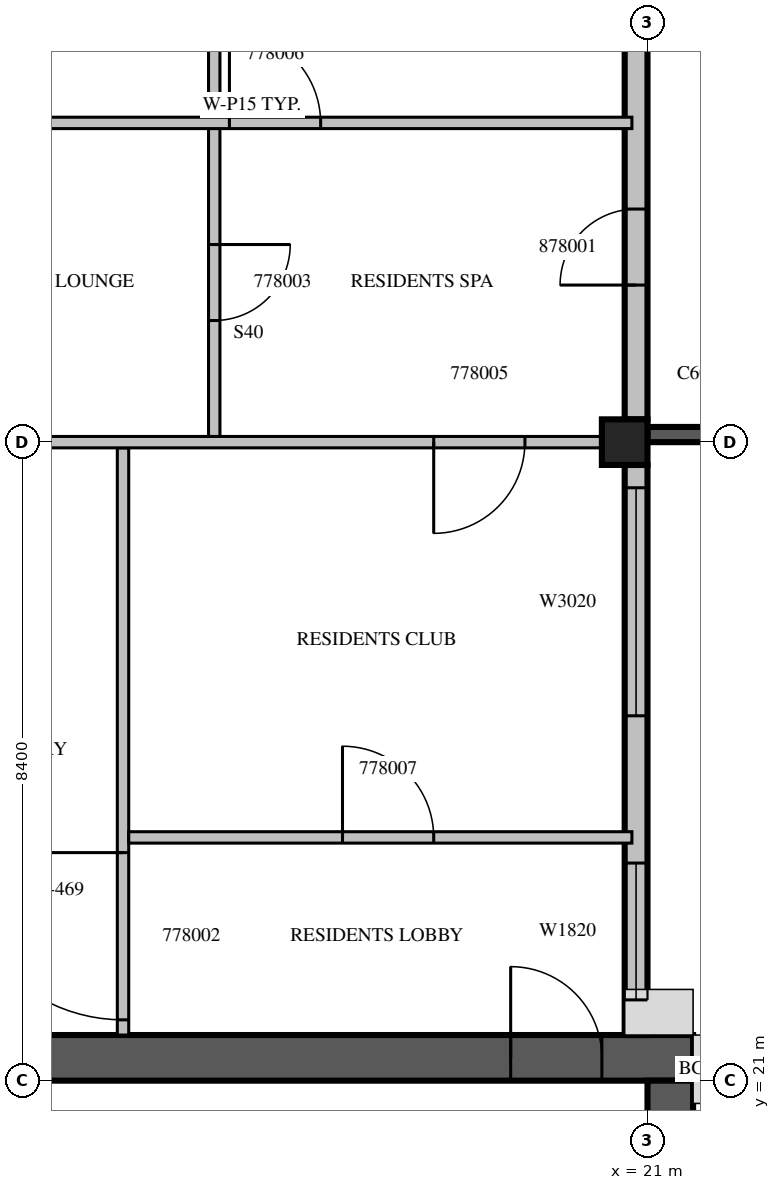
"""IFC4 building model, lengths in metres.
Left out: names, types, materials, properties, quantities, classifications, styles, units other than length and angle.
Written with IfcOpenShell. Run it as: python <this file> out.ifc"""

import sys

from ifc_helpers import new_model, si_unit, direction, frame, frame_2d, origin, origin_2d, place, context, subcontext, project, spatial, rectangle, extrude, source, transform, mapped, element, fill, save


model = new_model("IFC4")
c1 = context("Model", 3, precision=1e-05, world=origin(), true_north=direction((0.0, 1.0)))
c2 = subcontext(c1, "Body", "Model", "MODEL_VIEW")
j1 = project(units=[si_unit("LENGTHUNIT", "METRE"), si_unit("PLANEANGLEUNIT", "RADIAN")], contexts=[c1])
p1 = place(None, origin())
s1 = spatial("IfcSite", under=j1, at=p1, CompositionType="ELEMENT")
p2 = place(p1, origin())
s2 = spatial("IfcBuilding", under=s1, at=p2, CompositionType="ELEMENT")
p3 = place(p2, frame((0.0, 0.0, 333.5)))
s3 = spatial("IfcBuildingStorey", under=s2, at=p3, CompositionType="ELEMENT", Elevation=333.5)
m1 = source(origin(), c2, "Body", "SweptSolid", [
    extrude(rectangle(XDim=0.6, YDim=0.6, at=origin_2d()), origin(), (0.0, 0.0, 1.0), 3.5),
])
p4 = place(p3, frame((20.7, 29.4, 0.0), z_axis=(0.0, 0.0, 1.0), x_axis=(1.0, 0.0, 0.0)))
e1 = element("IfcColumn", 1, at=p4, inside=s3, PredefinedType="COLUMN", context=c2, shape_type="MappedRepresentation", body=[
    mapped(m1, transform((0.0, 0.0, 0.0), scale=1.0)),
])
m2 = source(origin(), c2, "Body", "SweptSolid", [
    extrude(rectangle(XDim=11.1, YDim=0.6, at=frame_2d((5.55, 0.0))), origin(), (0.0, 0.0, 1.0), 3.5),
])
p5 = place(p3, frame((10.5, 21.3, 0.0), z_axis=(0.0, 0.0, 1.0), x_axis=(1.0, 0.0, 0.0)))
e2 = element("IfcWall", 2, at=p5, inside=s3, PredefinedType="SHEAR", context=c2, shape_type="MappedRepresentation", body=[
    mapped(m2, transform((0.0, 0.0, 0.0), scale=1.0)),
])
m3 = source(origin(), c2, "Body", "SweptSolid", [
    extrude(rectangle(XDim=1.2, YDim=2.1, at=frame_2d((0.6, 1.05))), frame((0.0, 0.31, 0.0), z_axis=(0.0, -1.0, 0.0), x_axis=(1.0, 0.0, 0.0)), (0.0, 0.0, 1.0), 0.62),
])
p6 = place(p5, frame((8.7, 0.0, 0.0)))
e3 = element("IfcOpeningElement", 3, at=p6, cuts=e2, PredefinedType="OPENING", context=c2, shape_type="MappedRepresentation", body=[
    mapped(m3, transform((0.0, 0.0, 0.0), scale=1.0)),
])
p7 = place(p3, frame((21.3, 4.2, 0.0), z_axis=(0.0, 0.0, 1.0), x_axis=(0.0, 1.0, 0.0)))
e4 = element("IfcWall", 4, at=p7, inside=s3, PredefinedType="SHEAR", context=c2, shape_type="SweptSolid", body=[
    extrude(rectangle(XDim=16.8, YDim=0.6, at=frame_2d((8.4, 0.0))), origin(), (0.0, 0.0, 1.0), 3.5),
])
p8 = place(p7, frame((4.2, 0.0, 0.0)))
e5 = element("IfcOpeningElement", 5, at=p8, cuts=e4, PredefinedType="OPENING", context=c2, shape_type="MappedRepresentation", body=[
    mapped(m3, transform((0.0, 0.0, 0.0), scale=1.0)),
])
m4 = source(origin(), c2, "Body", "SweptSolid", [
    extrude(rectangle(XDim=1.2, YDim=2.4, at=frame_2d((0.6, 1.2))), frame((0.0, 0.31, 0.0), z_axis=(0.0, -1.0, 0.0), x_axis=(1.0, 0.0, 0.0)), (0.0, 0.0, 1.0), 0.62),
])
p9 = place(p7, frame((12.0, 0.0, 0.6)))
e6 = element("IfcOpeningElement", 6, at=p9, cuts=e4, PredefinedType="OPENING", context=c2, shape_type="MappedRepresentation", body=[
    mapped(m4, transform((0.0, 0.0, 0.0), scale=1.0)),
])
m5 = source(origin(), c2, "Body", "SweptSolid", [
    extrude(rectangle(XDim=3.9, YDim=0.2, at=frame_2d((1.95, 0.0))), origin(), (0.0, 0.0, 1.0), 3.1),
])
p10 = place(p3, frame((21.0, 29.5, 0.0), z_axis=(0.0, 0.0, 1.0), x_axis=(1.0, 0.0, 0.0)))
e7 = element("IfcWall", 7, at=p10, inside=s3, PredefinedType="SOLIDWALL", context=c2, shape_type="MappedRepresentation", body=[
    mapped(m5, transform((0.0, 0.0, 0.0), scale=1.0)),
])
m6 = source(origin(), c2, "Body", "SweptSolid", [
    extrude(rectangle(XDim=2.4, YDim=2.0, at=frame_2d((1.2, 1.0))), frame((0.0, 0.11, 0.0), z_axis=(0.0, -1.0, 0.0), x_axis=(1.0, 0.0, 0.0)), (0.0, 0.0, 1.0), 0.22),
])
p11 = place(p10, frame((0.75, 0.0, 0.6)))
e8 = element("IfcOpeningElement", 8, at=p11, cuts=e7, PredefinedType="OPENING", context=c2, shape_type="MappedRepresentation", body=[
    mapped(m6, transform((0.0, 0.0, 0.0), scale=1.0)),
])
m7 = source(origin(), c2, "Body", "SweptSolid", [
    extrude(rectangle(XDim=7.5, YDim=0.3, at=frame_2d((3.75, 0.0))), origin(), (0.0, 0.0, 1.0), 3.1),
])
p12 = place(p3, frame((20.85, 21.6, 0.0), z_axis=(0.0, 0.0, 1.0), x_axis=(0.0, 1.0, 0.0)))
e9 = element("IfcWall", 9, at=p12, inside=s3, PredefinedType="STANDARD", context=c2, shape_type="MappedRepresentation", body=[
    mapped(m7, transform((0.0, 0.0, 0.0), scale=1.0)),
])
m8 = source(origin(), c2, "Body", "SweptSolid", [
    extrude(rectangle(XDim=1.8, YDim=2.0, at=frame_2d((0.9, 1.0))), frame((0.0, 0.16, 0.0), z_axis=(0.0, -1.0, 0.0), x_axis=(1.0, 0.0, 0.0)), (0.0, 0.0, 1.0), 0.32),
])
p13 = place(p12, frame((0.463, 0.0, 0.6)))
e10 = element("IfcOpeningElement", 10, at=p13, cuts=e9, PredefinedType="OPENING", context=c2, shape_type="MappedRepresentation", body=[
    mapped(m8, transform((0.0, 0.0, 0.0), scale=1.0)),
])
m9 = source(origin(), c2, "Body", "SweptSolid", [
    extrude(rectangle(XDim=3.0, YDim=2.0, at=frame_2d((1.5, 1.0))), frame((0.0, 0.16, 0.0), z_axis=(0.0, -1.0, 0.0), x_axis=(1.0, 0.0, 0.0)), (0.0, 0.0, 1.0), 0.32),
])
p14 = place(p12, frame((4.2, 0.0, 0.6)))
e11 = element("IfcOpeningElement", 11, at=p14, cuts=e9, PredefinedType="OPENING", context=c2, shape_type="MappedRepresentation", body=[
    mapped(m9, transform((0.0, 0.0, 0.0), scale=1.0)),
])
m10 = source(origin(), c2, "Body", "SweptSolid", [
    extrude(rectangle(XDim=7.8, YDim=0.3, at=frame_2d((3.9, 0.0))), origin(), (0.0, 0.0, 1.0), 3.1),
])
p15 = place(p3, frame((20.85, 29.7, 0.0), z_axis=(0.0, 0.0, 1.0), x_axis=(0.0, 1.0, 0.0)))
e12 = element("IfcWall", 12, at=p15, inside=s3, PredefinedType="STANDARD", context=c2, shape_type="MappedRepresentation", body=[
    mapped(m10, transform((0.0, 0.0, 0.0), scale=1.0)),
])
m11 = source(origin(), c2, "Body", "SweptSolid", [
    extrude(rectangle(XDim=1.0, YDim=2.1, at=frame_2d((0.5, 1.05))), frame((0.0, 0.16, 0.0), z_axis=(0.0, -1.0, 0.0), x_axis=(1.0, 0.0, 0.0)), (0.0, 0.0, 1.0), 0.32),
])
p16 = place(p15, frame((1.767, 0.0, 0.0)))
e13 = element("IfcOpeningElement", 13, at=p16, cuts=e12, PredefinedType="OPENING", context=c2, shape_type="MappedRepresentation", body=[
    mapped(m11, transform((0.0, 0.0, 0.0), scale=1.0)),
])
m12 = source(origin(), c2, "Body", "SweptSolid", [
    extrude(rectangle(XDim=7.725, YDim=0.15, at=frame_2d((3.862, 0.0))), origin(), (0.0, 0.0, 1.0), 3.1),
])
p17 = place(p3, frame((14.1, 29.325, 0.0), z_axis=(0.0, 0.0, 1.0), x_axis=(0.0, -1.0, 0.0)))
e14 = element("IfcWall", 14, at=p17, inside=s3, PredefinedType="PARTITIONING", context=c2, shape_type="MappedRepresentation", body=[
    mapped(m12, transform((0.0, 0.0, 0.0), scale=1.0)),
])
m13 = source(origin(), c2, "Body", "SweptSolid", [
    extrude(rectangle(XDim=2.2, YDim=2.1, at=frame_2d((1.1, 1.05))), frame((0.0, 0.085, 0.0), z_axis=(0.0, -1.0, 0.0), x_axis=(1.0, 0.0, 0.0)), (0.0, 0.0, 1.0), 0.17),
])
p18 = place(p17, frame((5.325, 0.0, 0.0)))
e15 = element("IfcOpeningElement", 15, at=p18, cuts=e14, PredefinedType="OPENING", context=c2, shape_type="MappedRepresentation", body=[
    mapped(m13, transform((0.0, 0.0, 0.0), scale=1.0)),
])
m14 = source(origin(), c2, "Body", "SweptSolid", [
    extrude(rectangle(XDim=6.62, YDim=0.15, at=frame_2d((3.31, 0.0))), origin(), (0.0, 0.0, 1.0), 3.1),
])
p19 = place(p3, frame((14.175, 24.2, 0.0), z_axis=(0.0, 0.0, 1.0), x_axis=(1.0, 0.0, 0.0)))
e16 = element("IfcWall", 16, at=p19, inside=s3, PredefinedType="PARTITIONING", context=c2, shape_type="MappedRepresentation", body=[
    mapped(m14, transform((0.0, 0.0, 0.0), scale=1.0)),
])
m15 = source(origin(), c2, "Body", "SweptSolid", [
    extrude(rectangle(XDim=1.2, YDim=2.1, at=frame_2d((0.6, 1.05))), frame((0.0, 0.085, 0.0), z_axis=(0.0, -1.0, 0.0), x_axis=(1.0, 0.0, 0.0)), (0.0, 0.0, 1.0), 0.17),
])
p20 = place(p19, frame((2.812, 0.0, 0.0)))
e17 = element("IfcOpeningElement", 17, at=p20, cuts=e16, PredefinedType="OPENING", context=c2, shape_type="MappedRepresentation", body=[
    mapped(m15, transform((0.0, 0.0, 0.0), scale=1.0)),
])
p21 = place(p3, frame((15.3, 33.6, 0.0), z_axis=(0.0, 0.0, 1.0), x_axis=(0.0, -1.0, 0.0)))
e18 = element("IfcWall", 18, at=p21, inside=s3, PredefinedType="PARTITIONING", context=c2, shape_type="SweptSolid", body=[
    extrude(rectangle(XDim=4.2, YDim=0.15, at=frame_2d((2.1, 0.0))), origin(), (0.0, 0.0, 1.0), 3.1),
])
m16 = source(origin(), c2, "Body", "SweptSolid", [
    extrude(rectangle(XDim=1.0, YDim=2.1, at=frame_2d((0.5, 1.05))), frame((0.0, 0.085, 0.0), z_axis=(0.0, -1.0, 0.0), x_axis=(1.0, 0.0, 0.0)), (0.0, 0.0, 1.0), 0.17),
])
p22 = place(p21, frame((1.6, 0.0, 0.0)))
e19 = element("IfcOpeningElement", 19, at=p22, cuts=e18, PredefinedType="OPENING", context=c2, shape_type="MappedRepresentation", body=[
    mapped(m16, transform((0.0, 0.0, 0.0), scale=1.0)),
])
p23 = place(p3, frame((15.3, 37.725, 0.0), z_axis=(0.0, 0.0, 1.0), x_axis=(0.0, -1.0, 0.0)))
e20 = element("IfcWall", 20, at=p23, inside=s3, PredefinedType="PARTITIONING", context=c2, shape_type="SweptSolid", body=[
    extrude(rectangle(XDim=4.105, YDim=0.15, at=frame_2d((2.053, 0.0))), origin(), (0.0, 0.0, 1.0), 3.1),
])
p24 = place(p23, frame((1.525, 0.0, 0.0)))
e21 = element("IfcOpeningElement", 21, at=p24, cuts=e20, PredefinedType="OPENING", context=c2, shape_type="MappedRepresentation", body=[
    mapped(m16, transform((0.0, 0.0, 0.0), scale=1.0)),
])
m17 = source(origin(), c2, "Body", "SweptSolid", [
    extrude(rectangle(XDim=9.302, YDim=0.15, at=frame_2d((4.651, 0.0))), origin(), (0.0, 0.0, 1.0), 3.1),
])
p25 = place(p3, frame((11.099, 29.4, 0.0), z_axis=(0.0, 0.0, 1.0), x_axis=(1.0, 0.0, 0.0)))
e22 = element("IfcWall", 22, at=p25, inside=s3, PredefinedType="PARTITIONING", context=c2, shape_type="MappedRepresentation", body=[
    mapped(m17, transform((0.0, 0.0, 0.0), scale=1.0)),
])
p26 = place(p25, frame((7.088, 0.0, 0.0)))
e23 = element("IfcOpeningElement", 23, at=p26, cuts=e22, PredefinedType="OPENING", context=c2, shape_type="MappedRepresentation", body=[
    mapped(m15, transform((0.0, 0.0, 0.0), scale=1.0)),
])
p27 = place(p3, frame((10.8, 33.6, 0.0), z_axis=(0.0, 0.0, 1.0), x_axis=(1.0, 0.0, 0.0)))
e24 = element("IfcWall", 24, at=p27, inside=s3, PredefinedType="PARTITIONING", context=c2, shape_type="SweptSolid", body=[
    extrude(rectangle(XDim=9.995, YDim=0.15, at=frame_2d((4.997, 0.0))), origin(), (0.0, 0.0, 1.0), 3.1),
])
p28 = place(p27, frame((4.7, 0.0, 0.0)))
e25 = element("IfcOpeningElement", 25, at=p28, cuts=e24, PredefinedType="OPENING", context=c2, shape_type="MappedRepresentation", body=[
    mapped(m15, transform((0.0, 0.0, 0.0), scale=1.0)),
])
m18 = source(origin(), c2, "Body", "SweptSolid", [
    extrude(rectangle(XDim=1.8, YDim=2.0, at=frame_2d((0.9, 1.0))), frame((0.0, 0.03, 0.0), z_axis=(0.0, -1.0, 0.0), x_axis=(1.0, 0.0, 0.0)), (0.0, 0.0, 1.0), 0.06),
])
p29 = place(p13, origin())
e26 = element("IfcWindow", 26, at=p29, inside=s3, PartitioningType="SINGLE_PANEL", PredefinedType="WINDOW", context=c2, shape_type="MappedRepresentation", body=[
    mapped(m18, transform((0.0, 0.0, 0.0), scale=1.0)),
])
fill(e10, e26)
m19 = source(origin(), c2, "Body", "SweptSolid", [
    extrude(rectangle(XDim=3.0, YDim=2.0, at=frame_2d((1.5, 1.0))), frame((0.0, 0.03, 0.0), z_axis=(0.0, -1.0, 0.0), x_axis=(1.0, 0.0, 0.0)), (0.0, 0.0, 1.0), 0.06),
])
p30 = place(p14, origin())
e27 = element("IfcWindow", 27, at=p30, inside=s3, PartitioningType="SINGLE_PANEL", PredefinedType="WINDOW", context=c2, shape_type="MappedRepresentation", body=[
    mapped(m19, transform((0.0, 0.0, 0.0), scale=1.0)),
])
fill(e11, e27)
m20 = source(origin(), c2, "Body", "SweptSolid", [
    extrude(rectangle(XDim=1.2, YDim=2.1, at=frame_2d((0.6, 1.05))), frame((0.0, 0.025, 0.0), z_axis=(0.0, -1.0, 0.0), x_axis=(1.0, 0.0, 0.0)), (0.0, 0.0, 1.0), 0.05),
])
p31 = place(p6, origin())
e28 = element("IfcDoor", 28, at=p31, inside=s3, OperationType="SINGLE_SWING_LEFT", PredefinedType="DOOR", context=c2, shape_type="MappedRepresentation", body=[
    mapped(m20, transform((0.0, 0.0, 0.0), scale=1.0)),
])
fill(e3, e28)
m21 = source(origin(), c2, "Body", "SweptSolid", [
    extrude(rectangle(XDim=2.2, YDim=2.1, at=frame_2d((1.1, 1.05))), frame((0.0, 0.025, 0.0), z_axis=(0.0, -1.0, 0.0), x_axis=(1.0, 0.0, 0.0)), (0.0, 0.0, 1.0), 0.05),
])
p32 = place(p18, origin())
e29 = element("IfcDoor", 29, at=p32, inside=s3, OperationType="DOUBLE_DOOR_SINGLE_SWING", PredefinedType="DOOR", context=c2, shape_type="MappedRepresentation", body=[
    mapped(m21, transform((0.0, 0.0, 0.0), scale=1.0)),
])
fill(e15, e29)
m22 = source(origin(), c2, "Body", "SweptSolid", [
    extrude(rectangle(XDim=1.0, YDim=2.1, at=frame_2d((0.5, 1.05))), frame((0.0, 0.025, 0.0), z_axis=(0.0, -1.0, 0.0), x_axis=(1.0, 0.0, 0.0)), (0.0, 0.0, 1.0), 0.05),
])
p33 = place(p22, origin())
e30 = element("IfcDoor", 30, at=p33, inside=s3, OperationType="SINGLE_SWING_LEFT", PredefinedType="DOOR", context=c2, shape_type="MappedRepresentation", body=[
    mapped(m22, transform((0.0, 0.0, 0.0), scale=1.0)),
])
fill(e19, e30)
p34 = place(p26, origin())
e31 = element("IfcDoor", 31, at=p34, inside=s3, OperationType="SINGLE_SWING_RIGHT", PredefinedType="DOOR", context=c2, shape_type="MappedRepresentation", body=[
    mapped(m20, transform((0.0, 0.0, 0.0), scale=1.0)),
])
fill(e23, e31)
p35 = place(p28, origin())
e32 = element("IfcDoor", 32, at=p35, inside=s3, OperationType="SINGLE_SWING_LEFT", PredefinedType="DOOR", context=c2, shape_type="MappedRepresentation", body=[
    mapped(m20, transform((0.0, 0.0, 0.0), scale=1.0)),
])
fill(e25, e32)
p36 = place(p20, origin())
e33 = element("IfcDoor", 33, at=p36, inside=s3, OperationType="SINGLE_SWING_LEFT", PredefinedType="DOOR", context=c2, shape_type="MappedRepresentation", body=[
    mapped(m20, transform((0.0, 0.0, 0.0), scale=1.0)),
])
fill(e17, e33)
p37 = place(p16, origin())
e34 = element("IfcDoor", 34, at=p37, inside=s3, OperationType="SINGLE_SWING_LEFT", PredefinedType="DOOR", context=c2, shape_type="MappedRepresentation", body=[
    mapped(m22, transform((0.0, 0.0, 0.0), scale=1.0)),
])
fill(e13, e34)
save(model, sys.argv[1])
